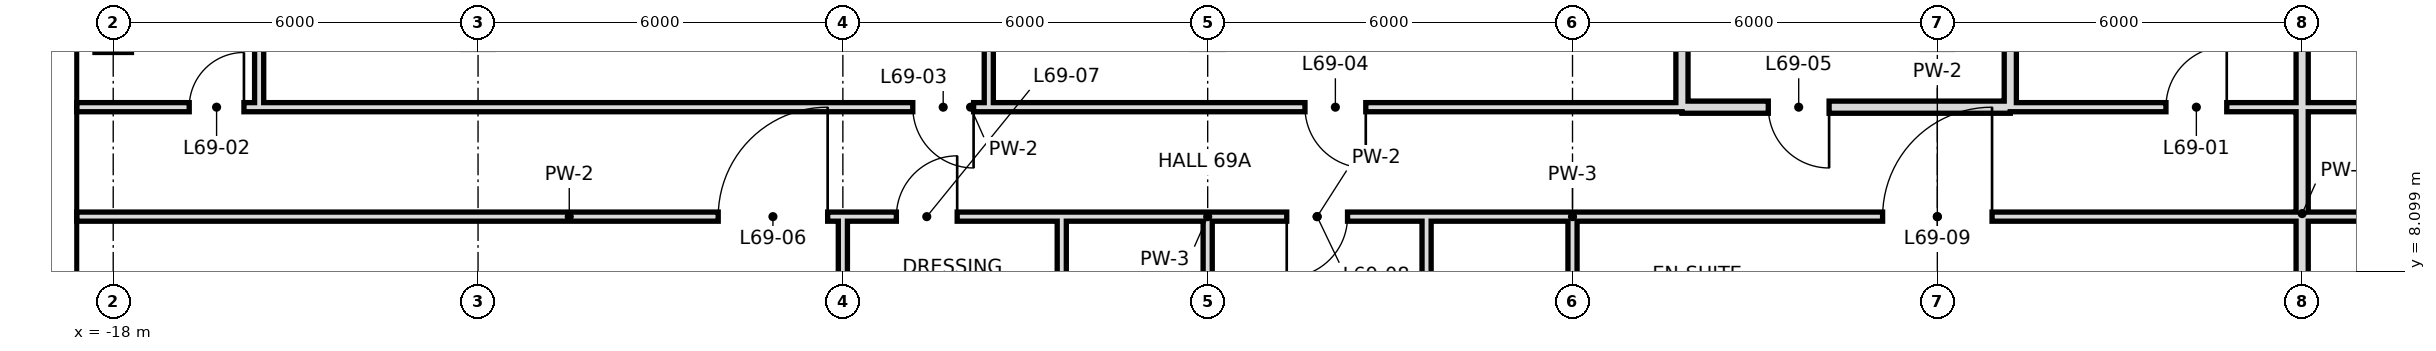
"""IFC4 building model, lengths in metres.
Left out: names, types, materials, properties, quantities, classifications, styles, units other than length and angle.
Written with IfcOpenShell. Run it as: python <this file> out.ifc"""

import sys

from ifc_helpers import new_model, si_unit, direction, frame, frame_2d, origin, place, context, subcontext, project, spatial, rectangle, extrude, element, fill, save


model = new_model("IFC4")
c1 = context("Model", 3, precision=1e-05, world=origin(), true_north=direction((0.0, 1.0)))
c2 = subcontext(c1, "Body", "Model", "MODEL_VIEW")
j1 = project(units=[si_unit("LENGTHUNIT", "METRE"), si_unit("PLANEANGLEUNIT", "RADIAN")], contexts=[c1])
p1 = place(None, origin())
s1 = spatial("IfcSite", under=j1, at=p1, CompositionType="ELEMENT")
p2 = place(p1, origin())
s2 = spatial("IfcBuilding", under=s1, at=p2, CompositionType="ELEMENT")
p3 = place(p2, frame((0.0, 0.0, 294.4)))
s3 = spatial("IfcBuildingStorey", under=s2, at=p3, CompositionType="ELEMENT", Elevation=294.4)
p4 = place(p3, frame((-15.6, 10.8, 0.0), z_axis=(0.0, 0.0, 1.0), x_axis=(0.0, 1.0, 0.0)))
e1 = element("IfcWall", 1, at=p4, inside=s3, PredefinedType="PARTITIONING", context=c2, shape_type="SweptSolid", body=[
    extrude(rectangle(XDim=7.2, YDim=0.15, at=frame_2d((3.6, 0.0))), origin(), (0.0, 0.0, 1.0), 3.42),
])
p5 = place(p3, frame((-2.4, 6.0, 0.0), z_axis=(0.0, 0.0, 1.0), x_axis=(0.0, 1.0, 0.0)))
e2 = element("IfcWall", 2, at=p5, inside=s3, PredefinedType="PARTITIONING", context=c2, shape_type="SweptSolid", body=[
    extrude(rectangle(XDim=3.0, YDim=0.15, at=frame_2d((1.5, 0.0))), origin(), (0.0, 0.0, 1.0), 3.42),
])
p6 = place(p3, frame((-3.6, 10.8, 0.0), z_axis=(0.0, 0.0, 1.0), x_axis=(0.0, 1.0, 0.0)))
e3 = element("IfcWall", 3, at=p6, inside=s3, PredefinedType="PARTITIONING", context=c2, shape_type="SweptSolid", body=[
    extrude(rectangle(XDim=7.2, YDim=0.15, at=frame_2d((3.6, 0.0))), origin(), (0.0, 0.0, 1.0), 3.42),
])
p7 = place(p3, frame((-6.0, -0.6, 0.0), z_axis=(0.0, 0.0, 1.0), x_axis=(0.0, 1.0, 0.0)))
e4 = element("IfcWall", 4, at=p7, inside=s3, PredefinedType="PARTITIONING", context=c2, shape_type="SweptSolid", body=[
    extrude(rectangle(XDim=9.6, YDim=0.15, at=frame_2d((4.8, 0.0))), origin(), (0.0, 0.0, 1.0), 3.42),
])
p8 = place(p3, frame((0.0, 6.0, 0.0), z_axis=(0.0, 0.0, 1.0), x_axis=(0.0, 1.0, 0.0)))
e5 = element("IfcWall", 5, at=p8, inside=s3, PredefinedType="PARTITIONING", context=c2, shape_type="SweptSolid", body=[
    extrude(rectangle(XDim=3.0, YDim=0.15, at=frame_2d((1.5, 0.0))), origin(), (0.0, 0.0, 1.0), 2.72),
])
p9 = place(p3, frame((13.2, 10.8, 0.0), z_axis=(0.0, 0.0, 1.0), x_axis=(0.0, 1.0, 0.0)))
e6 = element("IfcWall", 6, at=p9, inside=s3, PredefinedType="SOLIDWALL", context=c2, shape_type="SweptSolid", body=[
    extrude(rectangle(XDim=7.9, YDim=0.2, at=frame_2d((3.95, 0.0))), origin(), (0.0, 0.0, 1.0), 2.72),
])
p10 = place(p3, frame((18.0, -0.6, 0.0), z_axis=(0.0, 0.0, 1.0), x_axis=(0.0, 1.0, 0.0)))
e7 = element("IfcWall", 7, at=p10, inside=s3, PredefinedType="SOLIDWALL", context=c2, shape_type="SweptSolid", body=[
    extrude(rectangle(XDim=19.3, YDim=0.2, at=frame_2d((9.65, 0.0))), origin(), (0.0, 0.0, 1.0), 2.72),
])
for number, where, z_axis, x_axis in (
    (8, (3.6, 6.0, 0.0), (0.0, 0.0, 1.0), (0.0, 1.0, 0.0)),
    (9, (6.0, 6.0, 0.0), (0.0, 0.0, 1.0), (0.0, 1.0, 0.0)),
):
    element("IfcWall", number, at=place(p3, frame(where, z_axis=z_axis, x_axis=x_axis)), inside=s3, PredefinedType="PARTITIONING", context=c2, shape_type="SweptSolid", body=[
        extrude(rectangle(XDim=3.0, YDim=0.15, at=frame_2d((1.5, 0.0))), origin(), (0.0, 0.0, 1.0), 3.42),
    ])
p11 = place(p3, frame((7.8, 10.8, 0.0), z_axis=(0.0, 0.0, 1.0), x_axis=(0.0, 1.0, 0.0)))
e10 = element("IfcWall", 10, at=p11, inside=s3, PredefinedType="SOLIDWALL", context=c2, shape_type="SweptSolid", body=[
    extrude(rectangle(XDim=7.9, YDim=0.2, at=frame_2d((3.95, 0.0))), origin(), (0.0, 0.0, 1.0), 2.72),
])
p12 = place(p3, frame((7.8, 10.8, 0.0), z_axis=(0.0, 0.0, 1.0), x_axis=(1.0, 0.0, 0.0)))
e11 = element("IfcWall", 11, at=p12, inside=s3, PredefinedType="SOLIDWALL", context=c2, shape_type="SweptSolid", body=[
    extrude(rectangle(XDim=5.4, YDim=0.2, at=frame_2d((2.7, 0.0))), origin(), (0.0, 0.0, 1.0), 2.72),
])
p13 = place(p12, frame((1.42, 0.0, 0.0)))
e12 = element("IfcOpeningElement", 12, at=p13, cuts=e11, PredefinedType="OPENING", context=c2, shape_type="SweptSolid", body=[
    extrude(rectangle(XDim=1.0, YDim=2.4, at=frame_2d((0.5, 1.2))), frame((0.0, 0.11, 0.0), z_axis=(0.0, -1.0, 0.0), x_axis=(1.0, 0.0, 0.0)), (0.0, 0.0, 1.0), 0.22),
])
p14 = place(p3, frame((-15.6, 10.8, 0.0), z_axis=(0.0, 0.0, 1.0), x_axis=(1.0, 0.0, 0.0)))
e13 = element("IfcWall", 13, at=p14, inside=s3, PredefinedType="PARTITIONING", context=c2, shape_type="SweptSolid", body=[
    extrude(rectangle(XDim=23.4, YDim=0.15, at=frame_2d((11.7, 0.0))), origin(), (0.0, 0.0, 1.0), 3.42),
])
p15 = place(p14, frame((10.75, 0.0, 0.0)))
e14 = element("IfcOpeningElement", 14, at=p15, cuts=e13, PredefinedType="OPENING", context=c2, shape_type="SweptSolid", body=[
    extrude(rectangle(XDim=1.0, YDim=2.4, at=frame_2d((0.5, 1.2))), frame((0.0, 0.085, 0.0), z_axis=(0.0, -1.0, 0.0), x_axis=(1.0, 0.0, 0.0)), (0.0, 0.0, 1.0), 0.17),
])
p16 = place(p14, frame((17.2, 0.0, 0.0)))
e15 = element("IfcOpeningElement", 15, at=p16, cuts=e13, PredefinedType="OPENING", context=c2, shape_type="SweptSolid", body=[
    extrude(rectangle(XDim=1.0, YDim=2.4, at=frame_2d((0.5, 1.2))), frame((0.0, 0.085, 0.0), z_axis=(0.0, -1.0, 0.0), x_axis=(1.0, 0.0, 0.0)), (0.0, 0.0, 1.0), 0.17),
])
p17 = place(p3, frame((13.2, 10.8, 0.0), z_axis=(0.0, 0.0, 1.0), x_axis=(1.0, 0.0, 0.0)))
e16 = element("IfcWall", 16, at=p17, inside=s3, PredefinedType="PARTITIONING", context=c2, shape_type="SweptSolid", body=[
    extrude(rectangle(XDim=27.6, YDim=0.15, at=frame_2d((13.8, 0.0))), origin(), (0.0, 0.0, 1.0), 3.42),
])
p18 = place(p17, frame((2.56, 0.0, 0.0)))
e17 = element("IfcOpeningElement", 17, at=p18, cuts=e16, PredefinedType="OPENING", context=c2, shape_type="SweptSolid", body=[
    extrude(rectangle(XDim=1.0, YDim=2.4, at=frame_2d((0.5, 1.2))), frame((0.0, 0.085, 0.0), z_axis=(0.0, -1.0, 0.0), x_axis=(1.0, 0.0, 0.0)), (0.0, 0.0, 1.0), 0.17),
])
p19 = place(p17, frame((16.12, 0.0, 0.0)))
e18 = element("IfcOpeningElement", 18, at=p19, cuts=e16, PredefinedType="OPENING", context=c2, shape_type="SweptSolid", body=[
    extrude(rectangle(XDim=1.0, YDim=2.4, at=frame_2d((0.5, 1.2))), frame((0.0, 0.085, 0.0), z_axis=(0.0, -1.0, 0.0), x_axis=(1.0, 0.0, 0.0)), (0.0, 0.0, 1.0), 0.17),
])
p20 = place(p17, frame((9.1, 0.0, 0.0)))
e19 = element("IfcOpeningElement", 19, at=p20, cuts=e16, PredefinedType="OPENING", context=c2, shape_type="SweptSolid", body=[
    extrude(rectangle(XDim=1.0, YDim=2.4, at=frame_2d((0.5, 1.2))), frame((0.0, 0.085, 0.0), z_axis=(0.0, -1.0, 0.0), x_axis=(1.0, 0.0, 0.0)), (0.0, 0.0, 1.0), 0.17),
])
p21 = place(p17, frame((20.68, 0.0, 0.0)))
e20 = element("IfcOpeningElement", 20, at=p21, cuts=e16, PredefinedType="OPENING", context=c2, shape_type="SweptSolid", body=[
    extrude(rectangle(XDim=1.0, YDim=2.4, at=frame_2d((0.5, 1.2))), frame((0.0, 0.085, 0.0), z_axis=(0.0, -1.0, 0.0), x_axis=(1.0, 0.0, 0.0)), (0.0, 0.0, 1.0), 0.17),
])
p22 = place(p3, frame((-18.6, 10.8, 0.0), z_axis=(0.0, 0.0, 1.0), x_axis=(1.0, 0.0, 0.0)))
e21 = element("IfcWall", 21, at=p22, inside=s3, PredefinedType="PARTITIONING", context=c2, shape_type="SweptSolid", body=[
    extrude(rectangle(XDim=3.0, YDim=0.15, at=frame_2d((1.5, 0.0))), origin(), (0.0, 0.0, 1.0), 3.42),
])
p23 = place(p22, frame((1.85, 0.0, 0.0)))
e22 = element("IfcOpeningElement", 22, at=p23, cuts=e21, PredefinedType="OPENING", context=c2, shape_type="SweptSolid", body=[
    extrude(rectangle(XDim=0.9, YDim=2.4, at=frame_2d((0.45, 1.2))), frame((0.0, 0.085, 0.0), z_axis=(0.0, -1.0, 0.0), x_axis=(1.0, 0.0, 0.0)), (0.0, 0.0, 1.0), 0.17),
])
p24 = place(p3, frame((-18.6, 9.0, 0.0), z_axis=(0.0, 0.0, 1.0), x_axis=(1.0, 0.0, 0.0)))
e23 = element("IfcWall", 23, at=p24, inside=s3, PredefinedType="PARTITIONING", context=c2, shape_type="SweptSolid", body=[
    extrude(rectangle(XDim=16.2, YDim=0.15, at=frame_2d((8.1, 0.0))), origin(), (0.0, 0.0, 1.0), 3.42),
])
p25 = place(p24, frame((10.55, 0.0, 0.0)))
e24 = element("IfcOpeningElement", 24, at=p25, cuts=e23, PredefinedType="OPENING", context=c2, shape_type="SweptSolid", body=[
    extrude(rectangle(XDim=1.8, YDim=2.4, at=frame_2d((0.9, 1.2))), frame((0.0, 0.085, 0.0), z_axis=(0.0, -1.0, 0.0), x_axis=(1.0, 0.0, 0.0)), (0.0, 0.0, 1.0), 0.17),
])
p26 = place(p24, frame((13.48, 0.0, 0.0)))
e25 = element("IfcOpeningElement", 25, at=p26, cuts=e23, PredefinedType="OPENING", context=c2, shape_type="SweptSolid", body=[
    extrude(rectangle(XDim=1.0, YDim=2.4, at=frame_2d((0.5, 1.2))), frame((0.0, 0.085, 0.0), z_axis=(0.0, -1.0, 0.0), x_axis=(1.0, 0.0, 0.0)), (0.0, 0.0, 1.0), 0.17),
])
p27 = place(p3, frame((0.0, 9.0, 0.0), z_axis=(0.0, 0.0, 1.0), x_axis=(1.0, 0.0, 0.0)))
e26 = element("IfcWall", 26, at=p27, inside=s3, PredefinedType="PARTITIONING", context=c2, shape_type="SweptSolid", body=[
    extrude(rectangle(XDim=3.6, YDim=0.15, at=frame_2d((1.8, 0.0))), origin(), (0.0, 0.0, 1.0), 3.42),
])
p28 = place(p27, frame((1.3, 0.0, 0.0)))
e27 = element("IfcOpeningElement", 27, at=p28, cuts=e26, PredefinedType="OPENING", context=c2, shape_type="SweptSolid", body=[
    extrude(rectangle(XDim=1.0, YDim=2.4, at=frame_2d((0.5, 1.2))), frame((0.0, 0.085, 0.0), z_axis=(0.0, -1.0, 0.0), x_axis=(1.0, 0.0, 0.0)), (0.0, 0.0, 1.0), 0.17),
])
p29 = place(p3, frame((6.0, 9.0, 0.0), z_axis=(0.0, 0.0, 1.0), x_axis=(1.0, 0.0, 0.0)))
e28 = element("IfcWall", 28, at=p29, inside=s3, PredefinedType="PARTITIONING", context=c2, shape_type="SweptSolid", body=[
    extrude(rectangle(XDim=12.0, YDim=0.15, at=frame_2d((6.0, 0.0))), origin(), (0.0, 0.0, 1.0), 3.42),
])
p30 = place(p29, frame((5.1, 0.0, 0.0)))
e29 = element("IfcOpeningElement", 29, at=p30, cuts=e28, PredefinedType="OPENING", context=c2, shape_type="SweptSolid", body=[
    extrude(rectangle(XDim=1.8, YDim=2.4, at=frame_2d((0.9, 1.2))), frame((0.0, 0.085, 0.0), z_axis=(0.0, -1.0, 0.0), x_axis=(1.0, 0.0, 0.0)), (0.0, 0.0, 1.0), 0.17),
])
for number, where, z_axis, x_axis in (
    (30, (-2.4, 9.0, 0.0), (0.0, 0.0, 1.0), (1.0, 0.0, 0.0)),
    (31, (3.6, 9.0, 0.0), (0.0, 0.0, 1.0), (1.0, 0.0, 0.0)),
    (32, (18.0, 9.0, 0.0), (0.0, 0.0, 1.0), (1.0, 0.0, 0.0)),
):
    element("IfcWall", number, at=place(p3, frame(where, z_axis=z_axis, x_axis=x_axis)), inside=s3, PredefinedType="PARTITIONING", context=c2, shape_type="SweptSolid", body=[
        extrude(rectangle(XDim=2.4, YDim=0.15, at=frame_2d((1.2, 0.0))), origin(), (0.0, 0.0, 1.0), 3.42),
    ])
p31 = place(p18, frame((1.0, 0.0, 0.0), z_axis=(0.0, 0.0, 1.0), x_axis=(-1.0, 0.0, 0.0)))
e33 = element("IfcDoor", 33, at=p31, inside=s3, OperationType="SINGLE_SWING_LEFT", PredefinedType="DOOR", context=c2, shape_type="SweptSolid", body=[
    extrude(rectangle(XDim=1.0, YDim=2.4, at=frame_2d((0.5, 1.2))), frame((0.0, 0.025, 0.0), z_axis=(0.0, -1.0, 0.0), x_axis=(1.0, 0.0, 0.0)), (0.0, 0.0, 1.0), 0.05),
])
fill(e17, e33)
p32 = place(p23, frame((0.9, 0.0, 0.0), z_axis=(0.0, 0.0, 1.0), x_axis=(-1.0, 0.0, 0.0)))
e34 = element("IfcDoor", 34, at=p32, inside=s3, OperationType="SINGLE_SWING_LEFT", PredefinedType="DOOR", context=c2, shape_type="SweptSolid", body=[
    extrude(rectangle(XDim=0.9, YDim=2.4, at=frame_2d((0.45, 1.2))), frame((0.0, 0.025, 0.0), z_axis=(0.0, -1.0, 0.0), x_axis=(1.0, 0.0, 0.0)), (0.0, 0.0, 1.0), 0.05),
])
fill(e22, e34)
p33 = place(p15, origin())
e35 = element("IfcDoor", 35, at=p33, inside=s3, OperationType="SINGLE_SWING_RIGHT", PredefinedType="DOOR", context=c2, shape_type="SweptSolid", body=[
    extrude(rectangle(XDim=1.0, YDim=2.4, at=frame_2d((0.5, 1.2))), frame((0.0, 0.025, 0.0), z_axis=(0.0, -1.0, 0.0), x_axis=(1.0, 0.0, 0.0)), (0.0, 0.0, 1.0), 0.05),
])
fill(e14, e35)
p34 = place(p16, origin())
e36 = element("IfcDoor", 36, at=p34, inside=s3, OperationType="SINGLE_SWING_RIGHT", PredefinedType="DOOR", context=c2, shape_type="SweptSolid", body=[
    extrude(rectangle(XDim=1.0, YDim=2.4, at=frame_2d((0.5, 1.2))), frame((0.0, 0.025, 0.0), z_axis=(0.0, -1.0, 0.0), x_axis=(1.0, 0.0, 0.0)), (0.0, 0.0, 1.0), 0.05),
])
fill(e15, e36)
p35 = place(p13, origin())
e37 = element("IfcDoor", 37, at=p35, inside=s3, OperationType="SINGLE_SWING_RIGHT", PredefinedType="DOOR", context=c2, shape_type="SweptSolid", body=[
    extrude(rectangle(XDim=1.0, YDim=2.4, at=frame_2d((0.5, 1.2))), frame((0.0, 0.025, 0.0), z_axis=(0.0, -1.0, 0.0), x_axis=(1.0, 0.0, 0.0)), (0.0, 0.0, 1.0), 0.05),
])
fill(e12, e37)
p36 = place(p25, frame((1.8, 0.0, 0.0), z_axis=(0.0, 0.0, 1.0), x_axis=(-1.0, 0.0, 0.0)))
e38 = element("IfcDoor", 38, at=p36, inside=s3, OperationType="SINGLE_SWING_LEFT", PredefinedType="DOOR", context=c2, shape_type="SweptSolid", body=[
    extrude(rectangle(XDim=1.8, YDim=2.4, at=frame_2d((0.9, 1.2))), frame((0.0, 0.025, 0.0), z_axis=(0.0, -1.0, 0.0), x_axis=(1.0, 0.0, 0.0)), (0.0, 0.0, 1.0), 0.05),
])
fill(e24, e38)
p37 = place(p26, frame((1.0, 0.0, 0.0), z_axis=(0.0, 0.0, 1.0), x_axis=(-1.0, 0.0, 0.0)))
e39 = element("IfcDoor", 39, at=p37, inside=s3, OperationType="SINGLE_SWING_LEFT", PredefinedType="DOOR", context=c2, shape_type="SweptSolid", body=[
    extrude(rectangle(XDim=1.0, YDim=2.4, at=frame_2d((0.5, 1.2))), frame((0.0, 0.025, 0.0), z_axis=(0.0, -1.0, 0.0), x_axis=(1.0, 0.0, 0.0)), (0.0, 0.0, 1.0), 0.05),
])
fill(e25, e39)
p38 = place(p28, frame((1.0, 0.0, 0.0), z_axis=(0.0, 0.0, 1.0), x_axis=(-1.0, 0.0, 0.0)))
e40 = element("IfcDoor", 40, at=p38, inside=s3, OperationType="SINGLE_SWING_RIGHT", PredefinedType="DOOR", context=c2, shape_type="SweptSolid", body=[
    extrude(rectangle(XDim=1.0, YDim=2.4, at=frame_2d((0.5, 1.2))), frame((0.0, 0.025, 0.0), z_axis=(0.0, -1.0, 0.0), x_axis=(1.0, 0.0, 0.0)), (0.0, 0.0, 1.0), 0.05),
])
fill(e27, e40)
p39 = place(p30, frame((1.8, 0.0, 0.0), z_axis=(0.0, 0.0, 1.0), x_axis=(-1.0, 0.0, 0.0)))
e41 = element("IfcDoor", 41, at=p39, inside=s3, OperationType="SINGLE_SWING_LEFT", PredefinedType="DOOR", context=c2, shape_type="SweptSolid", body=[
    extrude(rectangle(XDim=1.8, YDim=2.4, at=frame_2d((0.9, 1.2))), frame((0.0, 0.025, 0.0), z_axis=(0.0, -1.0, 0.0), x_axis=(1.0, 0.0, 0.0)), (0.0, 0.0, 1.0), 0.05),
])
fill(e29, e41)
save(model, sys.argv[1])
